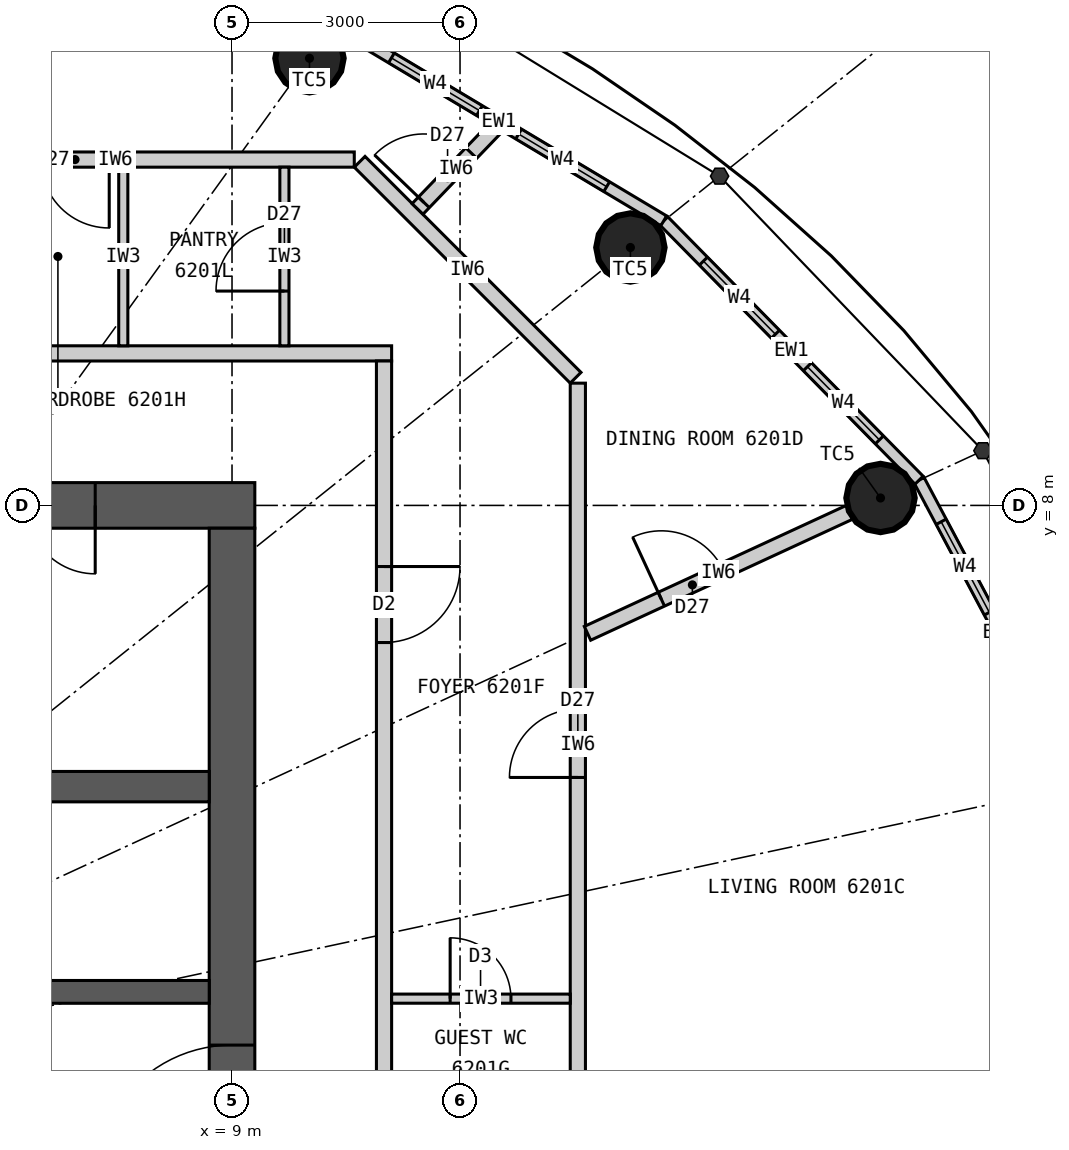
"""IFC4 building model, lengths in metres.
Left out: names, types, materials, properties, quantities, classifications, styles, units other than length and angle.
Written with IfcOpenShell. Run it as: python <this file> out.ifc"""

import sys

from ifc_helpers import new_model, si_unit, direction, frame, frame_2d, origin, origin_2d, place, context, subcontext, project, spatial, rectangle, circle, extrude, clip, halfspace, element, fill, save


model = new_model("IFC4")
c1 = context("Model", 3, precision=1e-05, world=origin(), true_north=direction((0.0, 1.0)))
c2 = subcontext(c1, "Body", "Model", "MODEL_VIEW")
j1 = project(units=[si_unit("LENGTHUNIT", "METRE"), si_unit("PLANEANGLEUNIT", "RADIAN")], contexts=[c1])
p1 = place(None, origin())
s1 = spatial("IfcSite", under=j1, at=p1, CompositionType="ELEMENT")
p2 = place(p1, origin())
s2 = spatial("IfcBuilding", under=s1, at=p2, CompositionType="ELEMENT")
p3 = place(p2, frame((0.0, 0.0, 229.2)))
s3 = spatial("IfcBuildingStorey", under=s2, at=p3, CompositionType="ELEMENT", Elevation=229.2)
for number, where, z_axis, x_axis in (
    (1, (17.532, 8.098, 0.0), (0.0, 0.0, 1.0), (1.0, 0.0, 0.0)),
    (2, (14.241, 11.393, 0.0), (0.0, 0.0, 1.0), (1.0, 0.0, 0.0)),
    (3, (10.019, 13.883, 0.0), (0.0, 0.0, 1.0), (1.0, 0.0, 0.0)),
):
    element("IfcColumn", number, at=place(p3, frame(where, z_axis=z_axis, x_axis=x_axis)), inside=s3, PredefinedType="COLUMN", context=c2, shape_type="Clipping", body=[
        clip(extrude(circle(Radius=0.45, at=origin_2d()), origin(), (0.0, 0.0, 1.0), 3.3), halfspace(frame((0.0, 0.0, 2.25), z_axis=(0.0, 0.0, 1.0), x_axis=(1.0, 0.0, 0.0)), False)),
    ])
p4 = place(p3, frame((-9.3, 8.0, 0.0), z_axis=(0.0, 0.0, 1.0), x_axis=(1.0, 0.0, 0.0)))
e4 = element("IfcWall", 4, at=p4, inside=s3, PredefinedType="SHEAR", context=c2, shape_type="SweptSolid", body=[
    extrude(rectangle(XDim=18.6, YDim=0.6, at=frame_2d((9.3, 0.0))), origin(), (0.0, 0.0, 1.0), 3.3),
])
p5 = place(p4, frame((8.0, 0.0, 0.0)))
e5 = element("IfcOpeningElement", 5, at=p5, cuts=e4, PredefinedType="OPENING", context=c2, shape_type="SweptSolid", body=[
    extrude(rectangle(XDim=1.2, YDim=2.2, at=frame_2d((0.6, 1.1))), frame((0.0, 0.31, 0.0), z_axis=(0.0, -1.0, 0.0), x_axis=(1.0, 0.0, 0.0)), (0.0, 0.0, 1.0), 0.62),
])
p6 = place(p4, frame((15.6, 0.0, 0.0)))
e6 = element("IfcOpeningElement", 6, at=p6, cuts=e4, PredefinedType="OPENING", context=c2, shape_type="SweptSolid", body=[
    extrude(rectangle(XDim=0.9, YDim=2.2, at=frame_2d((0.45, 1.1))), frame((0.0, 0.31, 0.0), z_axis=(0.0, -1.0, 0.0), x_axis=(1.0, 0.0, 0.0)), (0.0, 0.0, 1.0), 0.62),
])
p7 = place(p3, frame((9.0, -7.7, 0.0), z_axis=(0.0, 0.0, 1.0), x_axis=(0.0, 1.0, 0.0)))
e7 = element("IfcWall", 7, at=p7, inside=s3, PredefinedType="SHEAR", context=c2, shape_type="SweptSolid", body=[
    extrude(rectangle(XDim=15.4, YDim=0.6, at=frame_2d((7.7, 0.0))), origin(), (0.0, 0.0, 1.0), 3.3),
])
p8 = place(p7, frame((6.8, 0.0, 0.0)))
e8 = element("IfcOpeningElement", 8, at=p8, cuts=e7, PredefinedType="OPENING", context=c2, shape_type="SweptSolid", body=[
    extrude(rectangle(XDim=1.8, YDim=2.2, at=frame_2d((0.9, 1.1))), frame((0.0, 0.31, 0.0), z_axis=(0.0, -1.0, 0.0), x_axis=(1.0, 0.0, 0.0)), (0.0, 0.0, 1.0), 0.62),
])
p9 = place(p3, frame((-8.7, 4.3, 0.0), z_axis=(0.0, 0.0, 1.0), x_axis=(1.0, 0.0, 0.0)))
e9 = element("IfcWall", 9, at=p9, inside=s3, PredefinedType="SHEAR", context=c2, shape_type="SweptSolid", body=[
    extrude(rectangle(XDim=17.4, YDim=0.4, at=frame_2d((8.7, 0.0))), origin(), (0.0, 0.0, 1.0), 3.3),
])
p10 = place(p3, frame((-8.7, 1.6, 0.0), z_axis=(0.0, 0.0, 1.0), x_axis=(1.0, 0.0, 0.0)))
e10 = element("IfcWall", 10, at=p10, inside=s3, PredefinedType="SHEAR", context=c2, shape_type="SweptSolid", body=[
    extrude(rectangle(XDim=17.4, YDim=0.3, at=frame_2d((8.7, 0.0))), origin(), (0.0, 0.0, 1.0), 3.3),
])
p11 = place(p10, frame((12.65, 0.0, 0.0)))
e11 = element("IfcOpeningElement", 11, at=p11, cuts=e10, PredefinedType="OPENING", context=c2, shape_type="SweptSolid", body=[
    extrude(rectangle(XDim=1.1, YDim=2.2, at=frame_2d((0.55, 1.1))), frame((0.0, 0.16, 0.0), z_axis=(0.0, -1.0, 0.0), x_axis=(1.0, 0.0, 0.0)), (0.0, 0.0, 1.0), 0.32),
])
p12 = place(p10, frame((5.25, 0.0, 0.0)))
e12 = element("IfcOpeningElement", 12, at=p12, cuts=e10, PredefinedType="OPENING", context=c2, shape_type="SweptSolid", body=[
    extrude(rectangle(XDim=0.9, YDim=2.2, at=frame_2d((0.45, 1.1))), frame((0.0, 0.16, 0.0), z_axis=(0.0, -1.0, 0.0), x_axis=(1.0, 0.0, 0.0)), (0.0, 0.0, 1.0), 0.32),
])
p13 = place(p3, frame((20.17, 4.323, 0.0), z_axis=(0.0, 0.0, 1.0), x_axis=(-0.469256152955, 0.883062094597, 0.0)))
e13 = element("IfcWall", 13, at=p13, inside=s3, PredefinedType="ELEMENTEDWALL", context=c2, shape_type="SweptSolid", body=[
    extrude(rectangle(XDim=4.539, YDim=0.15, at=frame_2d((2.27, 0.0))), origin(), (0.0, 0.0, 1.0), 3.05),
])
p14 = place(p13, frame((0.62, 0.0, 0.9)))
e14 = element("IfcOpeningElement", 14, at=p14, cuts=e13, PredefinedType="OPENING", context=c2, shape_type="SweptSolid", body=[
    extrude(rectangle(XDim=1.35, YDim=1.9, at=frame_2d((0.675, 0.95))), frame((0.0, 0.085, 0.0), z_axis=(0.0, -1.0, 0.0), x_axis=(1.0, 0.0, 0.0)), (0.0, 0.0, 1.0), 0.17),
])
p15 = place(p13, frame((2.57, 0.0, 0.9)))
e15 = element("IfcOpeningElement", 15, at=p15, cuts=e13, PredefinedType="OPENING", context=c2, shape_type="SweptSolid", body=[
    extrude(rectangle(XDim=1.35, YDim=1.9, at=frame_2d((0.675, 0.95))), frame((0.0, 0.085, 0.0), z_axis=(0.0, -1.0, 0.0), x_axis=(1.0, 0.0, 0.0)), (0.0, 0.0, 1.0), 0.17),
])
p16 = place(p3, frame((18.04, 8.332, 0.0), z_axis=(0.0, 0.0, 1.0), x_axis=(-0.701527379618, 0.712642501993, 0.0)))
e16 = element("IfcWall", 16, at=p16, inside=s3, PredefinedType="ELEMENTEDWALL", context=c2, shape_type="SweptSolid", body=[
    extrude(rectangle(XDim=4.788, YDim=0.15, at=frame_2d((2.394, 0.0))), origin(), (0.0, 0.0, 1.0), 3.05),
])
p17 = place(p16, frame((0.744, 0.0, 0.9)))
e17 = element("IfcOpeningElement", 17, at=p17, cuts=e16, PredefinedType="OPENING", context=c2, shape_type="SweptSolid", body=[
    extrude(rectangle(XDim=1.35, YDim=1.9, at=frame_2d((0.675, 0.95))), frame((0.0, 0.085, 0.0), z_axis=(0.0, -1.0, 0.0), x_axis=(1.0, 0.0, 0.0)), (0.0, 0.0, 1.0), 0.17),
])
p18 = place(p16, frame((2.694, 0.0, 0.9)))
e18 = element("IfcOpeningElement", 18, at=p18, cuts=e16, PredefinedType="OPENING", context=c2, shape_type="SweptSolid", body=[
    extrude(rectangle(XDim=1.35, YDim=1.9, at=frame_2d((0.675, 0.95))), frame((0.0, 0.085, 0.0), z_axis=(0.0, -1.0, 0.0), x_axis=(1.0, 0.0, 0.0)), (0.0, 0.0, 1.0), 0.17),
])
p19 = place(p3, frame((14.68, 11.744, 0.0), z_axis=(0.0, 0.0, 1.0), x_axis=(-0.85822150553, 0.513279502265, 0.0)))
e19 = element("IfcWall", 19, at=p19, inside=s3, PredefinedType="ELEMENTEDWALL", context=c2, shape_type="SweptSolid", body=[
    extrude(rectangle(XDim=5.05, YDim=0.15, at=frame_2d((2.525, 0.0))), origin(), (0.0, 0.0, 1.0), 3.05),
])
p20 = place(p19, frame((0.875, 0.0, 0.9)))
e20 = element("IfcOpeningElement", 20, at=p20, cuts=e19, PredefinedType="OPENING", context=c2, shape_type="SweptSolid", body=[
    extrude(rectangle(XDim=1.35, YDim=1.9, at=frame_2d((0.675, 0.95))), frame((0.0, 0.085, 0.0), z_axis=(0.0, -1.0, 0.0), x_axis=(1.0, 0.0, 0.0)), (0.0, 0.0, 1.0), 0.17),
])
p21 = place(p19, frame((2.825, 0.0, 0.9)))
e21 = element("IfcOpeningElement", 21, at=p21, cuts=e19, PredefinedType="OPENING", context=c2, shape_type="SweptSolid", body=[
    extrude(rectangle(XDim=1.35, YDim=1.9, at=frame_2d((0.675, 0.95))), frame((0.0, 0.085, 0.0), z_axis=(0.0, -1.0, 0.0), x_axis=(1.0, 0.0, 0.0)), (0.0, 0.0, 1.0), 0.17),
])
p22 = place(p3, frame((-11.1, 10.0, 0.0), z_axis=(0.0, 0.0, 1.0), x_axis=(1.0, 0.0, 0.0)))
e22 = element("IfcWall", 22, at=p22, inside=s3, PredefinedType="PARTITIONING", context=c2, shape_type="SweptSolid", body=[
    extrude(rectangle(XDim=22.2, YDim=0.2, at=frame_2d((11.1, 0.0))), origin(), (0.0, 0.0, 1.0), 3.05),
])
p23 = place(p22, frame((2.29, 0.0, 0.0)))
e23 = element("IfcOpeningElement", 23, at=p23, cuts=e22, PredefinedType="OPENING", context=c2, shape_type="SweptSolid", body=[
    extrude(rectangle(XDim=1.0, YDim=2.2, at=frame_2d((0.5, 1.1))), frame((0.0, 0.11, 0.0), z_axis=(0.0, -1.0, 0.0), x_axis=(1.0, 0.0, 0.0)), (0.0, 0.0, 1.0), 0.22),
])
p24 = place(p3, frame((11.0, -9.9, 0.0), z_axis=(0.0, 0.0, 1.0), x_axis=(0.0, 1.0, 0.0)))
e24 = element("IfcWall", 24, at=p24, inside=s3, PredefinedType="PARTITIONING", context=c2, shape_type="SweptSolid", body=[
    extrude(rectangle(XDim=19.8, YDim=0.2, at=frame_2d((9.9, 0.0))), origin(), (0.0, 0.0, 1.0), 3.05),
])
p25 = place(p24, frame((16.096, 0.0, 0.0)))
e25 = element("IfcOpeningElement", 25, at=p25, cuts=e24, PredefinedType="OPENING", context=c2, shape_type="SweptSolid", body=[
    extrude(rectangle(XDim=1.0, YDim=2.2, at=frame_2d((0.5, 1.1))), frame((0.0, 0.11, 0.0), z_axis=(0.0, -1.0, 0.0), x_axis=(1.0, 0.0, 0.0)), (0.0, 0.0, 1.0), 0.22),
])
p26 = place(p3, frame((13.55, 0.101, 0.0), z_axis=(0.0, 0.0, 1.0), x_axis=(0.0, 1.0, 0.0)))
e26 = element("IfcWall", 26, at=p26, inside=s3, PredefinedType="PARTITIONING", context=c2, shape_type="SweptSolid", body=[
    extrude(rectangle(XDim=9.508, YDim=0.2, at=frame_2d((4.754, 0.0))), origin(), (0.0, 0.0, 1.0), 3.05),
])
p27 = place(p26, frame((4.32, 0.0, 0.0)))
e27 = element("IfcOpeningElement", 27, at=p27, cuts=e26, PredefinedType="OPENING", context=c2, shape_type="SweptSolid", body=[
    extrude(rectangle(XDim=0.9, YDim=2.1, at=frame_2d((0.45, 1.05))), frame((0.0, 0.11, 0.0), z_axis=(0.0, -1.0, 0.0), x_axis=(1.0, 0.0, 0.0)), (0.0, 0.0, 1.0), 0.22),
])
p28 = place(p3, frame((13.521, 9.679, 0.0), z_axis=(0.0, 0.0, 1.0), x_axis=(-0.707106781187, 0.707106781187, 0.0)))
e28 = element("IfcWall", 28, at=p28, inside=s3, PredefinedType="PARTITIONING", context=c2, shape_type="SweptSolid", body=[
    extrude(rectangle(XDim=4.019, YDim=0.2, at=frame_2d((2.009, 0.0))), origin(), (0.0, 0.0, 1.0), 3.05),
])
p29 = place(p3, frame((10.609, 12.55, 0.0), z_axis=(0.0, 0.0, 1.0), x_axis=(-1.0, 0.0, 0.0)))
e29 = element("IfcWall", 29, at=p29, inside=s3, PredefinedType="PARTITIONING", context=c2, shape_type="SweptSolid", body=[
    extrude(rectangle(XDim=6.284, YDim=0.2, at=frame_2d((3.142, 0.0))), origin(), (0.0, 0.0, 1.0), 3.05),
])
p30 = place(p29, frame((3.224, 0.0, 0.0)))
e30 = element("IfcOpeningElement", 30, at=p30, cuts=e29, PredefinedType="OPENING", context=c2, shape_type="SweptSolid", body=[
    extrude(rectangle(XDim=0.9, YDim=2.1, at=frame_2d((0.45, 1.05))), frame((0.0, 0.11, 0.0), z_axis=(0.0, -1.0, 0.0), x_axis=(1.0, 0.0, 0.0)), (0.0, 0.0, 1.0), 0.22),
])
p31 = place(p29, frame((4.944, 0.0, 0.0)))
e31 = element("IfcOpeningElement", 31, at=p31, cuts=e29, PredefinedType="OPENING", context=c2, shape_type="SweptSolid", body=[
    extrude(rectangle(XDim=0.8, YDim=2.1, at=frame_2d((0.4, 1.05))), frame((0.0, 0.11, 0.0), z_axis=(0.0, -1.0, 0.0), x_axis=(1.0, 0.0, 0.0)), (0.0, 0.0, 1.0), 0.22),
])
p32 = place(p3, frame((13.677, 6.317, 0.0), z_axis=(0.0, 0.0, 1.0), x_axis=(0.907825704695, 0.419347695708, 0.0)))
e32 = element("IfcWall", 32, at=p32, inside=s3, PredefinedType="PARTITIONING", context=c2, shape_type="SweptSolid", body=[
    extrude(rectangle(XDim=3.796, YDim=0.2, at=frame_2d((1.898, 0.0))), origin(), (0.0, 0.0, 1.0), 2.15),
])
p33 = place(p32, frame((1.07, 0.0, 0.0)))
e33 = element("IfcOpeningElement", 33, at=p33, cuts=e32, PredefinedType="OPENING", context=c2, shape_type="SweptSolid", body=[
    extrude(rectangle(XDim=0.9, YDim=2.1, at=frame_2d((0.45, 1.05))), frame((0.0, 0.11, 0.0), z_axis=(0.0, -1.0, 0.0), x_axis=(1.0, 0.0, 0.0)), (0.0, 0.0, 1.0), 0.22),
])
p34 = place(p3, frame((11.441, 11.9, 0.0), z_axis=(0.0, 0.0, 1.0), x_axis=(0.692958717259, 0.720977264672, 0.0)))
e34 = element("IfcWall", 34, at=p34, inside=s3, PredefinedType="PARTITIONING", context=c2, shape_type="SweptSolid", body=[
    extrude(rectangle(XDim=1.464, YDim=0.2, at=frame_2d((0.732, 0.0))), origin(), (0.0, 0.0, 1.0), 3.05),
])
p35 = place(p34, frame((0.12, 0.0, 0.0)))
e35 = element("IfcOpeningElement", 35, at=p35, cuts=e34, PredefinedType="OPENING", context=c2, shape_type="SweptSolid", body=[
    extrude(rectangle(XDim=0.9, YDim=2.1, at=frame_2d((0.45, 1.05))), frame((0.0, 0.11, 0.0), z_axis=(0.0, -1.0, 0.0), x_axis=(1.0, 0.0, 0.0)), (0.0, 0.0, 1.0), 0.22),
])
p36 = place(p3, frame((11.1, 1.511, 0.0), z_axis=(0.0, 0.0, 1.0), x_axis=(1.0, 0.0, 0.0)))
e36 = element("IfcWall", 36, at=p36, inside=s3, PredefinedType="PARTITIONING", context=c2, shape_type="SweptSolid", body=[
    extrude(rectangle(XDim=2.35, YDim=0.12, at=frame_2d((1.175, 0.0))), origin(), (0.0, 0.0, 1.0), 2.3),
])
p37 = place(p36, frame((0.77, 0.0, 0.0)))
e37 = element("IfcOpeningElement", 37, at=p37, cuts=e36, PredefinedType="OPENING", context=c2, shape_type="SweptSolid", body=[
    extrude(rectangle(XDim=0.8, YDim=2.1, at=frame_2d((0.4, 1.05))), frame((0.0, 0.07, 0.0), z_axis=(0.0, -1.0, 0.0), x_axis=(1.0, 0.0, 0.0)), (0.0, 0.0, 1.0), 0.14),
])
p38 = place(p3, frame((9.689, 10.1, 0.0), z_axis=(0.0, 0.0, 1.0), x_axis=(0.0, 1.0, 0.0)))
e38 = element("IfcWall", 38, at=p38, inside=s3, PredefinedType="PARTITIONING", context=c2, shape_type="SweptSolid", body=[
    extrude(rectangle(XDim=2.35, YDim=0.12, at=frame_2d((1.175, 0.0))), origin(), (0.0, 0.0, 1.0), 3.05),
])
p39 = place(p38, frame((0.72, 0.0, 0.0)))
e39 = element("IfcOpeningElement", 39, at=p39, cuts=e38, PredefinedType="OPENING", context=c2, shape_type="SweptSolid", body=[
    extrude(rectangle(XDim=0.9, YDim=2.1, at=frame_2d((0.45, 1.05))), frame((0.0, 0.07, 0.0), z_axis=(0.0, -1.0, 0.0), x_axis=(1.0, 0.0, 0.0)), (0.0, 0.0, 1.0), 0.14),
])
p40 = place(p3, frame((7.569, 10.1, 0.0), z_axis=(0.0, 0.0, 1.0), x_axis=(0.0, 1.0, 0.0)))
e40 = element("IfcWall", 40, at=p40, inside=s3, PredefinedType="PARTITIONING", context=c2, shape_type="SweptSolid", body=[
    extrude(rectangle(XDim=2.35, YDim=0.12, at=frame_2d((1.175, 0.0))), origin(), (0.0, 0.0, 1.0), 3.05),
])
p41 = place(p15, origin())
e41 = element("IfcWindow", 41, at=p41, inside=s3, PartitioningType="SINGLE_PANEL", PredefinedType="WINDOW", context=c2, shape_type="SweptSolid", body=[
    extrude(rectangle(XDim=1.35, YDim=1.9, at=frame_2d((0.675, 0.95))), frame((0.0, 0.03, 0.0), z_axis=(0.0, -1.0, 0.0), x_axis=(1.0, 0.0, 0.0)), (0.0, 0.0, 1.0), 0.06),
])
fill(e15, e41)
p42 = place(p17, origin())
e42 = element("IfcWindow", 42, at=p42, inside=s3, PartitioningType="SINGLE_PANEL", PredefinedType="WINDOW", context=c2, shape_type="SweptSolid", body=[
    extrude(rectangle(XDim=1.35, YDim=1.9, at=frame_2d((0.675, 0.95))), frame((0.0, 0.03, 0.0), z_axis=(0.0, -1.0, 0.0), x_axis=(1.0, 0.0, 0.0)), (0.0, 0.0, 1.0), 0.06),
])
fill(e17, e42)
p43 = place(p18, origin())
e43 = element("IfcWindow", 43, at=p43, inside=s3, PartitioningType="SINGLE_PANEL", PredefinedType="WINDOW", context=c2, shape_type="SweptSolid", body=[
    extrude(rectangle(XDim=1.35, YDim=1.9, at=frame_2d((0.675, 0.95))), frame((0.0, 0.03, 0.0), z_axis=(0.0, -1.0, 0.0), x_axis=(1.0, 0.0, 0.0)), (0.0, 0.0, 1.0), 0.06),
])
fill(e18, e43)
p44 = place(p20, origin())
e44 = element("IfcWindow", 44, at=p44, inside=s3, PartitioningType="SINGLE_PANEL", PredefinedType="WINDOW", context=c2, shape_type="SweptSolid", body=[
    extrude(rectangle(XDim=1.35, YDim=1.9, at=frame_2d((0.675, 0.95))), frame((0.0, 0.03, 0.0), z_axis=(0.0, -1.0, 0.0), x_axis=(1.0, 0.0, 0.0)), (0.0, 0.0, 1.0), 0.06),
])
fill(e20, e44)
p45 = place(p21, origin())
e45 = element("IfcWindow", 45, at=p45, inside=s3, PartitioningType="SINGLE_PANEL", PredefinedType="WINDOW", context=c2, shape_type="SweptSolid", body=[
    extrude(rectangle(XDim=1.35, YDim=1.9, at=frame_2d((0.675, 0.95))), frame((0.0, 0.03, 0.0), z_axis=(0.0, -1.0, 0.0), x_axis=(1.0, 0.0, 0.0)), (0.0, 0.0, 1.0), 0.06),
])
fill(e21, e45)
p46 = place(p25, origin())
e46 = element("IfcDoor", 46, at=p46, inside=s3, OperationType="SINGLE_SWING_RIGHT", PredefinedType="DOOR", context=c2, shape_type="SweptSolid", body=[
    extrude(rectangle(XDim=1.0, YDim=2.2, at=frame_2d((0.5, 1.1))), frame((0.0, 0.025, 0.0), z_axis=(0.0, -1.0, 0.0), x_axis=(1.0, 0.0, 0.0)), (0.0, 0.0, 1.0), 0.05),
])
fill(e25, e46)
p47 = place(p37, origin())
e47 = element("IfcDoor", 47, at=p47, inside=s3, OperationType="SINGLE_SWING_LEFT", PredefinedType="DOOR", context=c2, shape_type="SweptSolid", body=[
    extrude(rectangle(XDim=0.8, YDim=2.1, at=frame_2d((0.4, 1.05))), frame((0.0, 0.025, 0.0), z_axis=(0.0, -1.0, 0.0), x_axis=(1.0, 0.0, 0.0)), (0.0, 0.0, 1.0), 0.05),
])
fill(e37, e47)
p48 = place(p39, origin())
e48 = element("IfcDoor", 48, at=p48, inside=s3, OperationType="SINGLE_SWING_LEFT", PredefinedType="DOOR", context=c2, shape_type="SweptSolid", body=[
    extrude(rectangle(XDim=0.9, YDim=2.1, at=frame_2d((0.45, 1.05))), frame((0.0, 0.025, 0.0), z_axis=(0.0, -1.0, 0.0), x_axis=(1.0, 0.0, 0.0)), (0.0, 0.0, 1.0), 0.05),
])
fill(e39, e48)
p49 = place(p30, origin())
e49 = element("IfcDoor", 49, at=p49, inside=s3, OperationType="SINGLE_SWING_LEFT", PredefinedType="DOOR", context=c2, shape_type="SweptSolid", body=[
    extrude(rectangle(XDim=0.9, YDim=2.1, at=frame_2d((0.45, 1.05))), frame((0.0, 0.025, 0.0), z_axis=(0.0, -1.0, 0.0), x_axis=(1.0, 0.0, 0.0)), (0.0, 0.0, 1.0), 0.05),
])
fill(e30, e49)
p50 = place(p27, origin())
e50 = element("IfcDoor", 50, at=p50, inside=s3, OperationType="SINGLE_SWING_LEFT", PredefinedType="DOOR", context=c2, shape_type="SweptSolid", body=[
    extrude(rectangle(XDim=0.9, YDim=2.1, at=frame_2d((0.45, 1.05))), frame((0.0, 0.025, 0.0), z_axis=(0.0, -1.0, 0.0), x_axis=(1.0, 0.0, 0.0)), (0.0, 0.0, 1.0), 0.05),
])
fill(e27, e50)
p51 = place(p33, origin())
e51 = element("IfcDoor", 51, at=p51, inside=s3, OperationType="SINGLE_SWING_LEFT", PredefinedType="DOOR", context=c2, shape_type="SweptSolid", body=[
    extrude(rectangle(XDim=0.9, YDim=2.1, at=frame_2d((0.45, 1.05))), frame((0.0, 0.025, 0.0), z_axis=(0.0, -1.0, 0.0), x_axis=(1.0, 0.0, 0.0)), (0.0, 0.0, 1.0), 0.05),
])
fill(e33, e51)
p52 = place(p35, origin())
e52 = element("IfcDoor", 52, at=p52, inside=s3, OperationType="SINGLE_SWING_LEFT", PredefinedType="DOOR", context=c2, shape_type="SweptSolid", body=[
    extrude(rectangle(XDim=0.9, YDim=2.1, at=frame_2d((0.45, 1.05))), frame((0.0, 0.025, 0.0), z_axis=(0.0, -1.0, 0.0), x_axis=(1.0, 0.0, 0.0)), (0.0, 0.0, 1.0), 0.05),
])
fill(e35, e52)
p53 = place(p6, origin())
e53 = element("IfcDoor", 53, at=p53, inside=s3, OperationType="SINGLE_SWING_RIGHT", PredefinedType="DOOR", context=c2, shape_type="SweptSolid", body=[
    extrude(rectangle(XDim=0.9, YDim=2.2, at=frame_2d((0.45, 1.1))), frame((0.0, 0.025, 0.0), z_axis=(0.0, -1.0, 0.0), x_axis=(1.0, 0.0, 0.0)), (0.0, 0.0, 1.0), 0.05),
])
fill(e6, e53)
p54 = place(p8, origin())
e54 = element("IfcDoor", 54, at=p54, inside=s3, OperationType="DOUBLE_DOOR_DOUBLE_SWING", PredefinedType="DOOR", context=c2, shape_type="SweptSolid", body=[
    extrude(rectangle(XDim=1.8, YDim=2.2, at=frame_2d((0.9, 1.1))), frame((0.0, 0.025, 0.0), z_axis=(0.0, -1.0, 0.0), x_axis=(1.0, 0.0, 0.0)), (0.0, 0.0, 1.0), 0.05),
])
fill(e8, e54)
save(model, sys.argv[1])
